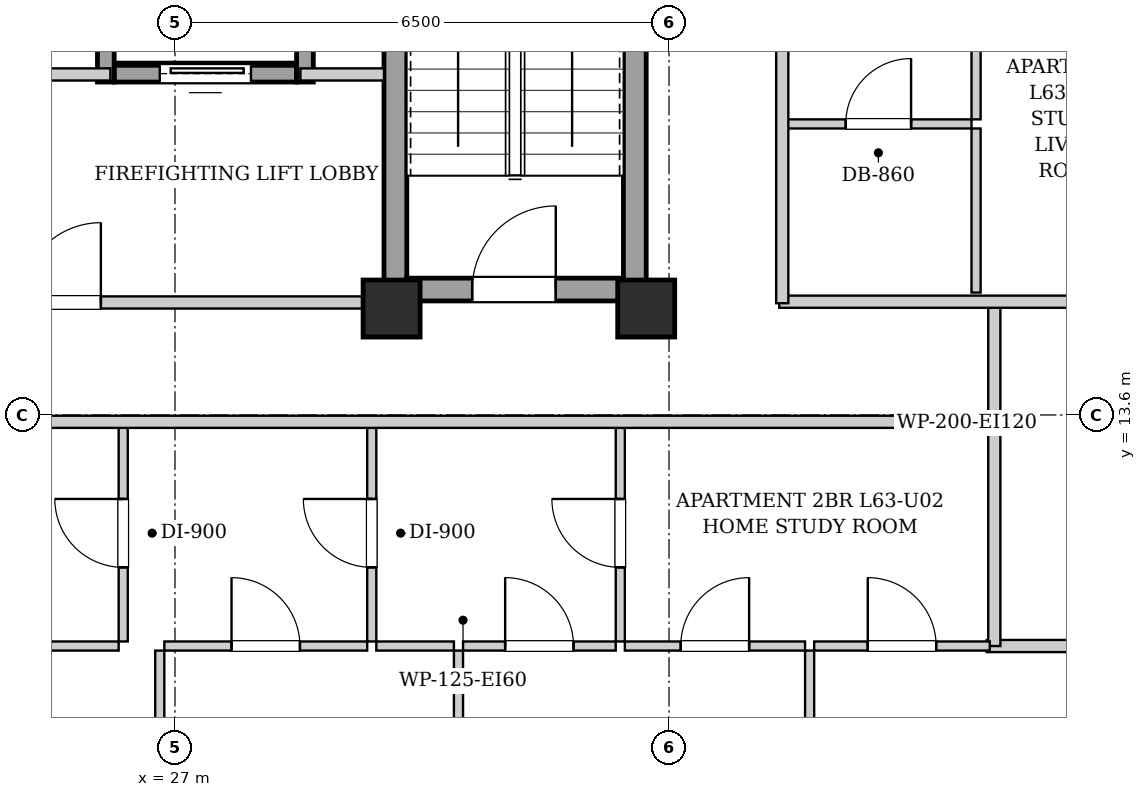
"""IFC4 building model, lengths in metres.
Left out: names, types, materials, properties, quantities, classifications, styles, units other than length and angle.
Written with IfcOpenShell. Run it as: python <this file> out.ifc"""

import sys

from ifc_helpers import new_model, si_unit, direction, frame, frame_2d, origin, origin_2d, place, context, subcontext, project, spatial, rectangle, extrude, element, fill, save


model = new_model("IFC4")
c1 = context("Model", 3, precision=1e-05, world=origin(), true_north=direction((0.0, 1.0)))
c2 = subcontext(c1, "Body", "Model", "MODEL_VIEW")
j1 = project(units=[si_unit("LENGTHUNIT", "METRE"), si_unit("PLANEANGLEUNIT", "RADIAN")], contexts=[c1])
p1 = place(None, origin())
s1 = spatial("IfcSite", under=j1, at=p1, CompositionType="ELEMENT")
p2 = place(p1, origin())
s2 = spatial("IfcBuilding", under=s1, at=p2, CompositionType="ELEMENT")
p3 = place(p2, frame((0.0, 0.0, 217.3)))
s3 = spatial("IfcBuildingStorey", under=s2, at=p3, CompositionType="ELEMENT", Elevation=217.3)
for number, where, z_axis, x_axis in (
    (1, (29.85, 15.0, 0.0), (0.0, 0.0, 1.0), (1.0, 0.0, 0.0)),
    (2, (33.2, 15.0, 0.0), (0.0, 0.0, 1.0), (1.0, 0.0, 0.0)),
):
    element("IfcColumn", number, at=place(p3, frame(where, z_axis=z_axis, x_axis=x_axis)), inside=s3, PredefinedType="COLUMN", context=c2, shape_type="SweptSolid", body=[
        extrude(rectangle(XDim=0.75, YDim=0.75, at=origin_2d()), origin(), (0.0, 0.0, 1.0), 3.4),
    ])
for number, where, z_axis, x_axis in (
    (3, (29.9, 15.1, 0.0), (0.0, 0.0, 1.0), (0.0, 1.0, 0.0)),
    (4, (33.05, 15.1, 0.0), (0.0, 0.0, 1.0), (0.0, 1.0, 0.0)),
):
    element("IfcWall", number, at=place(p3, frame(where, z_axis=z_axis, x_axis=x_axis)), inside=s3, PredefinedType="SHEAR", context=c2, shape_type="SweptSolid", body=[
        extrude(rectangle(XDim=9.0, YDim=0.3, at=frame_2d((4.5, 0.0))), origin(), (0.0, 0.0, 1.0), 3.14),
    ])
p4 = place(p3, frame((30.05, 15.25, 0.0), z_axis=(0.0, 0.0, 1.0), x_axis=(1.0, 0.0, 0.0)))
e5 = element("IfcWall", 5, at=p4, inside=s3, PredefinedType="SHEAR", context=c2, shape_type="SweptSolid", body=[
    extrude(rectangle(XDim=2.85, YDim=0.3, at=frame_2d((1.425, 0.0))), origin(), (0.0, 0.0, 1.0), 3.14),
])
p5 = place(p4, frame((0.86, 0.0, 0.0)))
e6 = element("IfcOpeningElement", 6, at=p5, cuts=e5, PredefinedType="OPENING", context=c2, shape_type="SweptSolid", body=[
    extrude(rectangle(XDim=1.1, YDim=2.05, at=frame_2d((0.55, 1.025))), frame((0.0, 0.16, 0.0), z_axis=(0.0, -1.0, 0.0), x_axis=(1.0, 0.0, 0.0)), (0.0, 0.0, 1.0), 0.32),
])
p6 = place(p3, frame((26.2, 18.09, 0.0), z_axis=(0.0, 0.0, 1.0), x_axis=(1.0, 0.0, 0.0)))
e7 = element("IfcWall", 7, at=p6, inside=s3, PredefinedType="SHEAR", context=c2, shape_type="SweptSolid", body=[
    extrude(rectangle(XDim=2.4, YDim=0.22, at=frame_2d((1.2, 0.0))), origin(), (0.0, 0.0, 1.0), 3.14),
])
p7 = place(p6, frame((0.6, 0.0, 0.0)))
e8 = element("IfcOpeningElement", 8, at=p7, cuts=e7, PredefinedType="OPENING", context=c2, shape_type="SweptSolid", body=[
    extrude(rectangle(XDim=1.2, YDim=2.15, at=frame_2d((0.6, 1.075))), frame((0.0, 0.12, 0.0), z_axis=(0.0, -1.0, 0.0), x_axis=(1.0, 0.0, 0.0)), (0.0, 0.0, 1.0), 0.24),
])
for number, where, z_axis, x_axis in (
    (9, (26.09, 17.98, 0.0), (0.0, 0.0, 1.0), (0.0, 1.0, 0.0)),
    (10, (28.71, 17.98, 0.0), (0.0, 0.0, 1.0), (0.0, 1.0, 0.0)),
):
    element("IfcWall", number, at=place(p3, frame(where, z_axis=z_axis, x_axis=x_axis)), inside=s3, PredefinedType="SHEAR", context=c2, shape_type="SweptSolid", body=[
        extrude(rectangle(XDim=2.54, YDim=0.22, at=frame_2d((1.27, 0.0))), origin(), (0.0, 0.0, 1.0), 3.14),
    ])
p8 = place(p3, frame((21.25, 15.08, 0.0), z_axis=(0.0, 0.0, 1.0), x_axis=(1.0, 0.0, 0.0)))
e11 = element("IfcWall", 11, at=p8, inside=s3, PredefinedType="PARTITIONING", context=c2, shape_type="SweptSolid", body=[
    extrude(rectangle(XDim=8.5, YDim=0.16, at=frame_2d((4.25, 0.0))), origin(), (0.0, 0.0, 1.0), 2.668),
])
p9 = place(p8, frame((3.725, 0.0, 0.0)))
e12 = element("IfcOpeningElement", 12, at=p9, cuts=e11, PredefinedType="OPENING", context=c2, shape_type="SweptSolid", body=[
    extrude(rectangle(XDim=1.05, YDim=2.05, at=frame_2d((0.525, 1.025))), frame((0.0, 0.09, 0.0), z_axis=(0.0, -1.0, 0.0), x_axis=(1.0, 0.0, 0.0)), (0.0, 0.0, 1.0), 0.18),
])
p10 = place(p3, frame((24.85, 18.08, 0.0), z_axis=(0.0, 0.0, 1.0), x_axis=(1.0, 0.0, 0.0)))
e13 = element("IfcWall", 13, at=p10, inside=s3, PredefinedType="PARTITIONING", context=c2, shape_type="SweptSolid", body=[
    extrude(rectangle(XDim=1.3, YDim=0.16, at=frame_2d((0.65, 0.0))), origin(), (0.0, 0.0, 1.0), 3.14),
])
p11 = place(p3, frame((28.65, 18.08, 0.0), z_axis=(0.0, 0.0, 1.0), x_axis=(1.0, 0.0, 0.0)))
e14 = element("IfcWall", 14, at=p11, inside=s3, PredefinedType="PARTITIONING", context=c2, shape_type="SweptSolid", body=[
    extrude(rectangle(XDim=1.1, YDim=0.16, at=frame_2d((0.55, 0.0))), origin(), (0.0, 0.0, 1.0), 3.14),
])
p12 = place(p3, frame((37.78, 13.51, 0.0), z_axis=(0.0, 0.0, 1.0), x_axis=(0.0, 1.0, 0.0)))
e15 = element("IfcWall", 15, at=p12, inside=s3, PredefinedType="PARTITIONING", context=c2, shape_type="SweptSolid", body=[
    extrude(rectangle(XDim=1.58, YDim=0.16, at=frame_2d((0.79, 0.0))), origin(), (0.0, 0.0, 1.0), 3.14),
])
p13 = place(p3, frame((34.95, 15.09, 0.0), z_axis=(0.0, 0.0, 1.0), x_axis=(1.0, 0.0, 0.0)))
e16 = element("IfcWall", 16, at=p13, inside=s3, PredefinedType="PARTITIONING", context=c2, shape_type="SweptSolid", body=[
    extrude(rectangle(XDim=5.07, YDim=0.16, at=frame_2d((2.535, 0.0))), origin(), (0.0, 0.0, 1.0), 2.668),
])
p14 = place(p3, frame((37.68, 10.56, 0.0), z_axis=(0.0, 0.0, 1.0), x_axis=(1.0, 0.0, 0.0)))
e17 = element("IfcWall", 17, at=p14, inside=s3, PredefinedType="PARTITIONING", context=c2, shape_type="SweptSolid", body=[
    extrude(rectangle(XDim=2.34, YDim=0.16, at=frame_2d((1.17, 0.0))), origin(), (0.0, 0.0, 1.0), 3.14),
])
p15 = place(p3, frame((37.78, 10.56, 0.0), z_axis=(0.0, 0.0, 1.0), x_axis=(0.0, 1.0, 0.0)))
e18 = element("IfcWall", 18, at=p15, inside=s3, PredefinedType="PARTITIONING", context=c2, shape_type="SweptSolid", body=[
    extrude(rectangle(XDim=2.91, YDim=0.16, at=frame_2d((1.455, 0.0))), origin(), (0.0, 0.0, 1.0), 3.14),
])
p16 = place(p3, frame((26.319, 10.62, 0.0), z_axis=(0.0, 0.0, 1.0), x_axis=(0.0, 1.0, 0.0)))
e19 = element("IfcWall", 19, at=p16, inside=s3, PredefinedType="PARTITIONING", context=c2, shape_type="SweptSolid", body=[
    extrude(rectangle(XDim=2.85, YDim=0.12, at=frame_2d((1.425, 0.0))), origin(), (0.0, 0.0, 1.0), 3.14),
])
p17 = place(p16, frame((0.975, 0.0, 0.0)))
e20 = element("IfcOpeningElement", 20, at=p17, cuts=e19, PredefinedType="OPENING", context=c2, shape_type="SweptSolid", body=[
    extrude(rectangle(XDim=0.9, YDim=2.05, at=frame_2d((0.45, 1.025))), frame((0.0, 0.07, 0.0), z_axis=(0.0, -1.0, 0.0), x_axis=(1.0, 0.0, 0.0)), (0.0, 0.0, 1.0), 0.14),
])
p18 = place(p3, frame((21.819, 10.56, 0.0), z_axis=(0.0, 0.0, 1.0), x_axis=(1.0, 0.0, 0.0)))
e21 = element("IfcWall", 21, at=p18, inside=s3, PredefinedType="PARTITIONING", context=c2, shape_type="SweptSolid", body=[
    extrude(rectangle(XDim=4.44, YDim=0.12, at=frame_2d((2.22, 0.0))), origin(), (0.0, 0.0, 1.0), 3.14),
])
p19 = place(p18, frame((1.77, 0.0, 0.0)))
e22 = element("IfcOpeningElement", 22, at=p19, cuts=e21, PredefinedType="OPENING", context=c2, shape_type="SweptSolid", body=[
    extrude(rectangle(XDim=0.9, YDim=2.05, at=frame_2d((0.45, 1.025))), frame((0.0, 0.07, 0.0), z_axis=(0.0, -1.0, 0.0), x_axis=(1.0, 0.0, 0.0)), (0.0, 0.0, 1.0), 0.14),
])
p20 = place(p3, frame((29.589, 10.62, 0.0), z_axis=(0.0, 0.0, 1.0), x_axis=(0.0, 1.0, 0.0)))
e23 = element("IfcWall", 23, at=p20, inside=s3, PredefinedType="PARTITIONING", context=c2, shape_type="SweptSolid", body=[
    extrude(rectangle(XDim=2.85, YDim=0.12, at=frame_2d((1.425, 0.0))), origin(), (0.0, 0.0, 1.0), 3.14),
])
p21 = place(p20, frame((0.975, 0.0, 0.0)))
e24 = element("IfcOpeningElement", 24, at=p21, cuts=e23, PredefinedType="OPENING", context=c2, shape_type="SweptSolid", body=[
    extrude(rectangle(XDim=0.9, YDim=2.05, at=frame_2d((0.45, 1.025))), frame((0.0, 0.07, 0.0), z_axis=(0.0, -1.0, 0.0), x_axis=(1.0, 0.0, 0.0)), (0.0, 0.0, 1.0), 0.14),
])
p22 = place(p3, frame((26.86, 10.56, 0.0), z_axis=(0.0, 0.0, 1.0), x_axis=(1.0, 0.0, 0.0)))
e25 = element("IfcWall", 25, at=p22, inside=s3, PredefinedType="PARTITIONING", context=c2, shape_type="SweptSolid", body=[
    extrude(rectangle(XDim=2.669, YDim=0.12, at=frame_2d((1.334, 0.0))), origin(), (0.0, 0.0, 1.0), 3.14),
])
p23 = place(p22, frame((0.884, 0.0, 0.0)))
e26 = element("IfcOpeningElement", 26, at=p23, cuts=e25, PredefinedType="OPENING", context=c2, shape_type="SweptSolid", body=[
    extrude(rectangle(XDim=0.9, YDim=2.05, at=frame_2d((0.45, 1.025))), frame((0.0, 0.07, 0.0), z_axis=(0.0, -1.0, 0.0), x_axis=(1.0, 0.0, 0.0)), (0.0, 0.0, 1.0), 0.14),
])
p24 = place(p3, frame((32.859, 10.62, 0.0), z_axis=(0.0, 0.0, 1.0), x_axis=(0.0, 1.0, 0.0)))
e27 = element("IfcWall", 27, at=p24, inside=s3, PredefinedType="PARTITIONING", context=c2, shape_type="SweptSolid", body=[
    extrude(rectangle(XDim=2.85, YDim=0.12, at=frame_2d((1.425, 0.0))), origin(), (0.0, 0.0, 1.0), 3.14),
])
p25 = place(p24, frame((0.975, 0.0, 0.0)))
e28 = element("IfcOpeningElement", 28, at=p25, cuts=e27, PredefinedType="OPENING", context=c2, shape_type="SweptSolid", body=[
    extrude(rectangle(XDim=0.9, YDim=2.05, at=frame_2d((0.45, 1.025))), frame((0.0, 0.07, 0.0), z_axis=(0.0, -1.0, 0.0), x_axis=(1.0, 0.0, 0.0)), (0.0, 0.0, 1.0), 0.14),
])
p26 = place(p3, frame((29.649, 10.56, 0.0), z_axis=(0.0, 0.0, 1.0), x_axis=(1.0, 0.0, 0.0)))
e29 = element("IfcWall", 29, at=p26, inside=s3, PredefinedType="PARTITIONING", context=c2, shape_type="SweptSolid", body=[
    extrude(rectangle(XDim=1.021, YDim=0.12, at=frame_2d((0.51, 0.0))), origin(), (0.0, 0.0, 1.0), 3.14),
])
p27 = place(p3, frame((30.79, 10.56, 0.0), z_axis=(0.0, 0.0, 1.0), x_axis=(1.0, 0.0, 0.0)))
e30 = element("IfcWall", 30, at=p27, inside=s3, PredefinedType="PARTITIONING", context=c2, shape_type="SweptSolid", body=[
    extrude(rectangle(XDim=2.009, YDim=0.12, at=frame_2d((1.004, 0.0))), origin(), (0.0, 0.0, 1.0), 3.14),
])
p28 = place(p27, frame((0.554, 0.0, 0.0)))
e31 = element("IfcOpeningElement", 31, at=p28, cuts=e30, PredefinedType="OPENING", context=c2, shape_type="SweptSolid", body=[
    extrude(rectangle(XDim=0.9, YDim=2.05, at=frame_2d((0.45, 1.025))), frame((0.0, 0.07, 0.0), z_axis=(0.0, -1.0, 0.0), x_axis=(1.0, 0.0, 0.0)), (0.0, 0.0, 1.0), 0.14),
])
p29 = place(p3, frame((32.919, 10.56, 0.0), z_axis=(0.0, 0.0, 1.0), x_axis=(1.0, 0.0, 0.0)))
e32 = element("IfcWall", 32, at=p29, inside=s3, PredefinedType="PARTITIONING", context=c2, shape_type="SweptSolid", body=[
    extrude(rectangle(XDim=2.371, YDim=0.12, at=frame_2d((1.186, 0.0))), origin(), (0.0, 0.0, 1.0), 3.14),
])
p30 = place(p29, frame((0.735, 0.0, 0.0)))
e33 = element("IfcOpeningElement", 33, at=p30, cuts=e32, PredefinedType="OPENING", context=c2, shape_type="SweptSolid", body=[
    extrude(rectangle(XDim=0.9, YDim=2.05, at=frame_2d((0.45, 1.025))), frame((0.0, 0.07, 0.0), z_axis=(0.0, -1.0, 0.0), x_axis=(1.0, 0.0, 0.0)), (0.0, 0.0, 1.0), 0.14),
])
p31 = place(p3, frame((35.41, 10.56, 0.0), z_axis=(0.0, 0.0, 1.0), x_axis=(1.0, 0.0, 0.0)))
e34 = element("IfcWall", 34, at=p31, inside=s3, PredefinedType="PARTITIONING", context=c2, shape_type="SweptSolid", body=[
    extrude(rectangle(XDim=2.31, YDim=0.12, at=frame_2d((1.155, 0.0))), origin(), (0.0, 0.0, 1.0), 3.14),
])
p32 = place(p31, frame((0.705, 0.0, 0.0)))
e35 = element("IfcOpeningElement", 35, at=p32, cuts=e34, PredefinedType="OPENING", context=c2, shape_type="SweptSolid", body=[
    extrude(rectangle(XDim=0.9, YDim=2.05, at=frame_2d((0.45, 1.025))), frame((0.0, 0.07, 0.0), z_axis=(0.0, -1.0, 0.0), x_axis=(1.0, 0.0, 0.0)), (0.0, 0.0, 1.0), 0.14),
])
p33 = place(p3, frame((26.8, 4.08, 0.0), z_axis=(0.0, 0.0, 1.0), x_axis=(0.0, 1.0, 0.0)))
e36 = element("IfcWall", 36, at=p33, inside=s3, PredefinedType="PARTITIONING", context=c2, shape_type="SweptSolid", body=[
    extrude(rectangle(XDim=6.42, YDim=0.12, at=frame_2d((3.21, 0.0))), origin(), (0.0, 0.0, 1.0), 3.14),
])
p34 = place(p33, frame((2.745, 0.0, 0.0)))
e37 = element("IfcOpeningElement", 37, at=p34, cuts=e36, PredefinedType="OPENING", context=c2, shape_type="SweptSolid", body=[
    extrude(rectangle(XDim=0.9, YDim=2.05, at=frame_2d((0.45, 1.025))), frame((0.0, 0.07, 0.0), z_axis=(0.0, -1.0, 0.0), x_axis=(1.0, 0.0, 0.0)), (0.0, 0.0, 1.0), 0.14),
])
p35 = place(p3, frame((30.73, 4.08, 0.0), z_axis=(0.0, 0.0, 1.0), x_axis=(0.0, 1.0, 0.0)))
e38 = element("IfcWall", 38, at=p35, inside=s3, PredefinedType="PARTITIONING", context=c2, shape_type="SweptSolid", body=[
    extrude(rectangle(XDim=6.42, YDim=0.12, at=frame_2d((3.21, 0.0))), origin(), (0.0, 0.0, 1.0), 3.14),
])
p36 = place(p35, frame((2.745, 0.0, 0.0)))
e39 = element("IfcOpeningElement", 39, at=p36, cuts=e38, PredefinedType="OPENING", context=c2, shape_type="SweptSolid", body=[
    extrude(rectangle(XDim=0.9, YDim=2.05, at=frame_2d((0.45, 1.025))), frame((0.0, 0.07, 0.0), z_axis=(0.0, -1.0, 0.0), x_axis=(1.0, 0.0, 0.0)), (0.0, 0.0, 1.0), 0.14),
])
p37 = place(p3, frame((35.35, 4.08, 0.0), z_axis=(0.0, 0.0, 1.0), x_axis=(0.0, 1.0, 0.0)))
e40 = element("IfcWall", 40, at=p37, inside=s3, PredefinedType="PARTITIONING", context=c2, shape_type="SweptSolid", body=[
    extrude(rectangle(XDim=6.42, YDim=0.12, at=frame_2d((3.21, 0.0))), origin(), (0.0, 0.0, 1.0), 3.14),
])
p38 = place(p37, frame((2.745, 0.0, 0.0)))
e41 = element("IfcOpeningElement", 41, at=p38, cuts=e40, PredefinedType="OPENING", context=c2, shape_type="SweptSolid", body=[
    extrude(rectangle(XDim=0.9, YDim=2.05, at=frame_2d((0.45, 1.025))), frame((0.0, 0.07, 0.0), z_axis=(0.0, -1.0, 0.0), x_axis=(1.0, 0.0, 0.0)), (0.0, 0.0, 1.0), 0.14),
])
p39 = place(p3, frame((35.03, 17.429, 0.0), z_axis=(0.0, 0.0, 1.0), x_axis=(1.0, 0.0, 0.0)))
e42 = element("IfcWall", 42, at=p39, inside=s3, PredefinedType="PARTITIONING", context=c2, shape_type="SweptSolid", body=[
    extrude(rectangle(XDim=2.45, YDim=0.12, at=frame_2d((1.225, 0.0))), origin(), (0.0, 0.0, 1.0), 3.14),
])
p40 = place(p39, frame((0.795, 0.0, 0.0)))
e43 = element("IfcOpeningElement", 43, at=p40, cuts=e42, PredefinedType="OPENING", context=c2, shape_type="SweptSolid", body=[
    extrude(rectangle(XDim=0.86, YDim=2.05, at=frame_2d((0.43, 1.025))), frame((0.0, 0.07, 0.0), z_axis=(0.0, -1.0, 0.0), x_axis=(1.0, 0.0, 0.0)), (0.0, 0.0, 1.0), 0.14),
])
p41 = place(p3, frame((37.54, 15.21, 0.0), z_axis=(0.0, 0.0, 1.0), x_axis=(0.0, 1.0, 0.0)))
e44 = element("IfcWall", 44, at=p41, inside=s3, PredefinedType="PARTITIONING", context=c2, shape_type="SweptSolid", body=[
    extrude(rectangle(XDim=2.159, YDim=0.12, at=frame_2d((1.08, 0.0))), origin(), (0.0, 0.0, 1.0), 3.14),
])
p42 = place(p3, frame((37.54, 17.489, 0.0), z_axis=(0.0, 0.0, 1.0), x_axis=(0.0, 1.0, 0.0)))
e45 = element("IfcWall", 45, at=p42, inside=s3, PredefinedType="PARTITIONING", context=c2, shape_type="SweptSolid", body=[
    extrude(rectangle(XDim=5.433, YDim=0.12, at=frame_2d((2.717, 0.0))), origin(), (0.0, 0.0, 1.0), 3.14),
])
p43 = place(p42, frame((2.266, 0.0, 0.0)))
e46 = element("IfcOpeningElement", 46, at=p43, cuts=e45, PredefinedType="OPENING", context=c2, shape_type="SweptSolid", body=[
    extrude(rectangle(XDim=0.9, YDim=2.05, at=frame_2d((0.45, 1.025))), frame((0.0, 0.07, 0.0), z_axis=(0.0, -1.0, 0.0), x_axis=(1.0, 0.0, 0.0)), (0.0, 0.0, 1.0), 0.14),
])
p44 = place(p3, frame((13.15, 13.51, 0.0), z_axis=(0.0, 0.0, 1.0), x_axis=(1.0, 0.0, 0.0)))
e47 = element("IfcWall", 47, at=p44, inside=s3, PredefinedType="PARTITIONING", context=c2, shape_type="SweptSolid", body=[
    extrude(rectangle(XDim=24.6, YDim=0.16, at=frame_2d((12.3, 0.0))), origin(), (0.0, 0.0, 1.0), 3.14),
])
p45 = place(p44, frame((3.165, 0.0, 0.0)))
e48 = element("IfcOpeningElement", 48, at=p45, cuts=e47, PredefinedType="OPENING", context=c2, shape_type="SweptSolid", body=[
    extrude(rectangle(XDim=0.95, YDim=2.1, at=frame_2d((0.475, 1.05))), frame((0.0, 0.09, 0.0), z_axis=(0.0, -1.0, 0.0), x_axis=(1.0, 0.0, 0.0)), (0.0, 0.0, 1.0), 0.18),
])
p46 = place(p44, frame((10.414, 0.0, 0.0)))
e49 = element("IfcOpeningElement", 49, at=p46, cuts=e47, PredefinedType="OPENING", context=c2, shape_type="SweptSolid", body=[
    extrude(rectangle(XDim=0.95, YDim=2.1, at=frame_2d((0.475, 1.05))), frame((0.0, 0.09, 0.0), z_axis=(0.0, -1.0, 0.0), x_axis=(1.0, 0.0, 0.0)), (0.0, 0.0, 1.0), 0.18),
])
p47 = place(p3, frame((34.99, 15.07, 0.0), z_axis=(0.0, 0.0, 1.0), x_axis=(0.0, 1.0, 0.0)))
e50 = element("IfcWall", 50, at=p47, inside=s3, PredefinedType="PARTITIONING", context=c2, shape_type="SweptSolid", body=[
    extrude(rectangle(XDim=13.93, YDim=0.16, at=frame_2d((6.965, 0.0))), origin(), (0.0, 0.0, 1.0), 3.14),
])
p48 = place(p47, frame((4.661, 0.0, 0.0)))
e51 = element("IfcOpeningElement", 51, at=p48, cuts=e50, PredefinedType="OPENING", context=c2, shape_type="SweptSolid", body=[
    extrude(rectangle(XDim=0.95, YDim=2.1, at=frame_2d((0.475, 1.05))), frame((0.0, 0.09, 0.0), z_axis=(0.0, -1.0, 0.0), x_axis=(1.0, 0.0, 0.0)), (0.0, 0.0, 1.0), 0.18),
])
p49 = place(p47, frame((11.411, 0.0, 0.0)))
e52 = element("IfcOpeningElement", 52, at=p49, cuts=e50, PredefinedType="OPENING", context=c2, shape_type="SweptSolid", body=[
    extrude(rectangle(XDim=0.95, YDim=2.1, at=frame_2d((0.475, 1.05))), frame((0.0, 0.09, 0.0), z_axis=(0.0, -1.0, 0.0), x_axis=(1.0, 0.0, 0.0)), (0.0, 0.0, 1.0), 0.18),
])
p50 = place(p5, origin())
e53 = element("IfcDoor", 53, at=p50, inside=s3, OperationType="SINGLE_SWING_RIGHT", PredefinedType="DOOR", context=c2, shape_type="SweptSolid", body=[
    extrude(rectangle(XDim=1.1, YDim=2.05, at=frame_2d((0.55, 1.025))), frame((0.0, 0.025, 0.0), z_axis=(0.0, -1.0, 0.0), x_axis=(1.0, 0.0, 0.0)), (0.0, 0.0, 1.0), 0.05),
])
fill(e6, e53)
p51 = place(p7, origin())
e54 = element("IfcDoor", 54, at=p51, inside=s3, OperationType="SLIDING_TO_LEFT", PredefinedType="DOOR", context=c2, shape_type="SweptSolid", body=[
    extrude(rectangle(XDim=1.2, YDim=2.15, at=frame_2d((0.6, 1.075))), frame((0.0, 0.025, 0.0), z_axis=(0.0, -1.0, 0.0), x_axis=(1.0, 0.0, 0.0)), (0.0, 0.0, 1.0), 0.05),
])
fill(e8, e54)
p52 = place(p9, origin())
e55 = element("IfcDoor", 55, at=p52, inside=s3, OperationType="SINGLE_SWING_RIGHT", PredefinedType="DOOR", context=c2, shape_type="SweptSolid", body=[
    extrude(rectangle(XDim=1.05, YDim=2.05, at=frame_2d((0.525, 1.025))), frame((0.0, 0.025, 0.0), z_axis=(0.0, -1.0, 0.0), x_axis=(1.0, 0.0, 0.0)), (0.0, 0.0, 1.0), 0.05),
])
fill(e12, e55)
p53 = place(p17, origin())
e56 = element("IfcDoor", 56, at=p53, inside=s3, OperationType="SINGLE_SWING_RIGHT", PredefinedType="DOOR", context=c2, shape_type="SweptSolid", body=[
    extrude(rectangle(XDim=0.9, YDim=2.05, at=frame_2d((0.45, 1.025))), frame((0.0, 0.025, 0.0), z_axis=(0.0, -1.0, 0.0), x_axis=(1.0, 0.0, 0.0)), (0.0, 0.0, 1.0), 0.05),
])
fill(e20, e56)
p54 = place(p21, origin())
e57 = element("IfcDoor", 57, at=p54, inside=s3, OperationType="SINGLE_SWING_RIGHT", PredefinedType="DOOR", context=c2, shape_type="SweptSolid", body=[
    extrude(rectangle(XDim=0.9, YDim=2.05, at=frame_2d((0.45, 1.025))), frame((0.0, 0.025, 0.0), z_axis=(0.0, -1.0, 0.0), x_axis=(1.0, 0.0, 0.0)), (0.0, 0.0, 1.0), 0.05),
])
fill(e24, e57)
p55 = place(p23, origin())
e58 = element("IfcDoor", 58, at=p55, inside=s3, OperationType="SINGLE_SWING_LEFT", PredefinedType="DOOR", context=c2, shape_type="SweptSolid", body=[
    extrude(rectangle(XDim=0.9, YDim=2.05, at=frame_2d((0.45, 1.025))), frame((0.0, 0.025, 0.0), z_axis=(0.0, -1.0, 0.0), x_axis=(1.0, 0.0, 0.0)), (0.0, 0.0, 1.0), 0.05),
])
fill(e26, e58)
p56 = place(p25, origin())
e59 = element("IfcDoor", 59, at=p56, inside=s3, OperationType="SINGLE_SWING_RIGHT", PredefinedType="DOOR", context=c2, shape_type="SweptSolid", body=[
    extrude(rectangle(XDim=0.9, YDim=2.05, at=frame_2d((0.45, 1.025))), frame((0.0, 0.025, 0.0), z_axis=(0.0, -1.0, 0.0), x_axis=(1.0, 0.0, 0.0)), (0.0, 0.0, 1.0), 0.05),
])
fill(e28, e59)
p57 = place(p28, origin())
e60 = element("IfcDoor", 60, at=p57, inside=s3, OperationType="SINGLE_SWING_LEFT", PredefinedType="DOOR", context=c2, shape_type="SweptSolid", body=[
    extrude(rectangle(XDim=0.9, YDim=2.05, at=frame_2d((0.45, 1.025))), frame((0.0, 0.025, 0.0), z_axis=(0.0, -1.0, 0.0), x_axis=(1.0, 0.0, 0.0)), (0.0, 0.0, 1.0), 0.05),
])
fill(e31, e60)
p58 = place(p30, origin())
e61 = element("IfcDoor", 61, at=p58, inside=s3, OperationType="SINGLE_SWING_RIGHT", PredefinedType="DOOR", context=c2, shape_type="SweptSolid", body=[
    extrude(rectangle(XDim=0.9, YDim=2.05, at=frame_2d((0.45, 1.025))), frame((0.0, 0.025, 0.0), z_axis=(0.0, -1.0, 0.0), x_axis=(1.0, 0.0, 0.0)), (0.0, 0.0, 1.0), 0.05),
])
fill(e33, e61)
p59 = place(p32, origin())
e62 = element("IfcDoor", 62, at=p59, inside=s3, OperationType="SINGLE_SWING_LEFT", PredefinedType="DOOR", context=c2, shape_type="SweptSolid", body=[
    extrude(rectangle(XDim=0.9, YDim=2.05, at=frame_2d((0.45, 1.025))), frame((0.0, 0.025, 0.0), z_axis=(0.0, -1.0, 0.0), x_axis=(1.0, 0.0, 0.0)), (0.0, 0.0, 1.0), 0.05),
])
fill(e35, e62)
p60 = place(p40, origin())
e63 = element("IfcDoor", 63, at=p60, inside=s3, OperationType="SINGLE_SWING_RIGHT", PredefinedType="DOOR", context=c2, shape_type="SweptSolid", body=[
    extrude(rectangle(XDim=0.86, YDim=2.05, at=frame_2d((0.43, 1.025))), frame((0.0, 0.025, 0.0), z_axis=(0.0, -1.0, 0.0), x_axis=(1.0, 0.0, 0.0)), (0.0, 0.0, 1.0), 0.05),
])
fill(e43, e63)
save(model, sys.argv[1])
